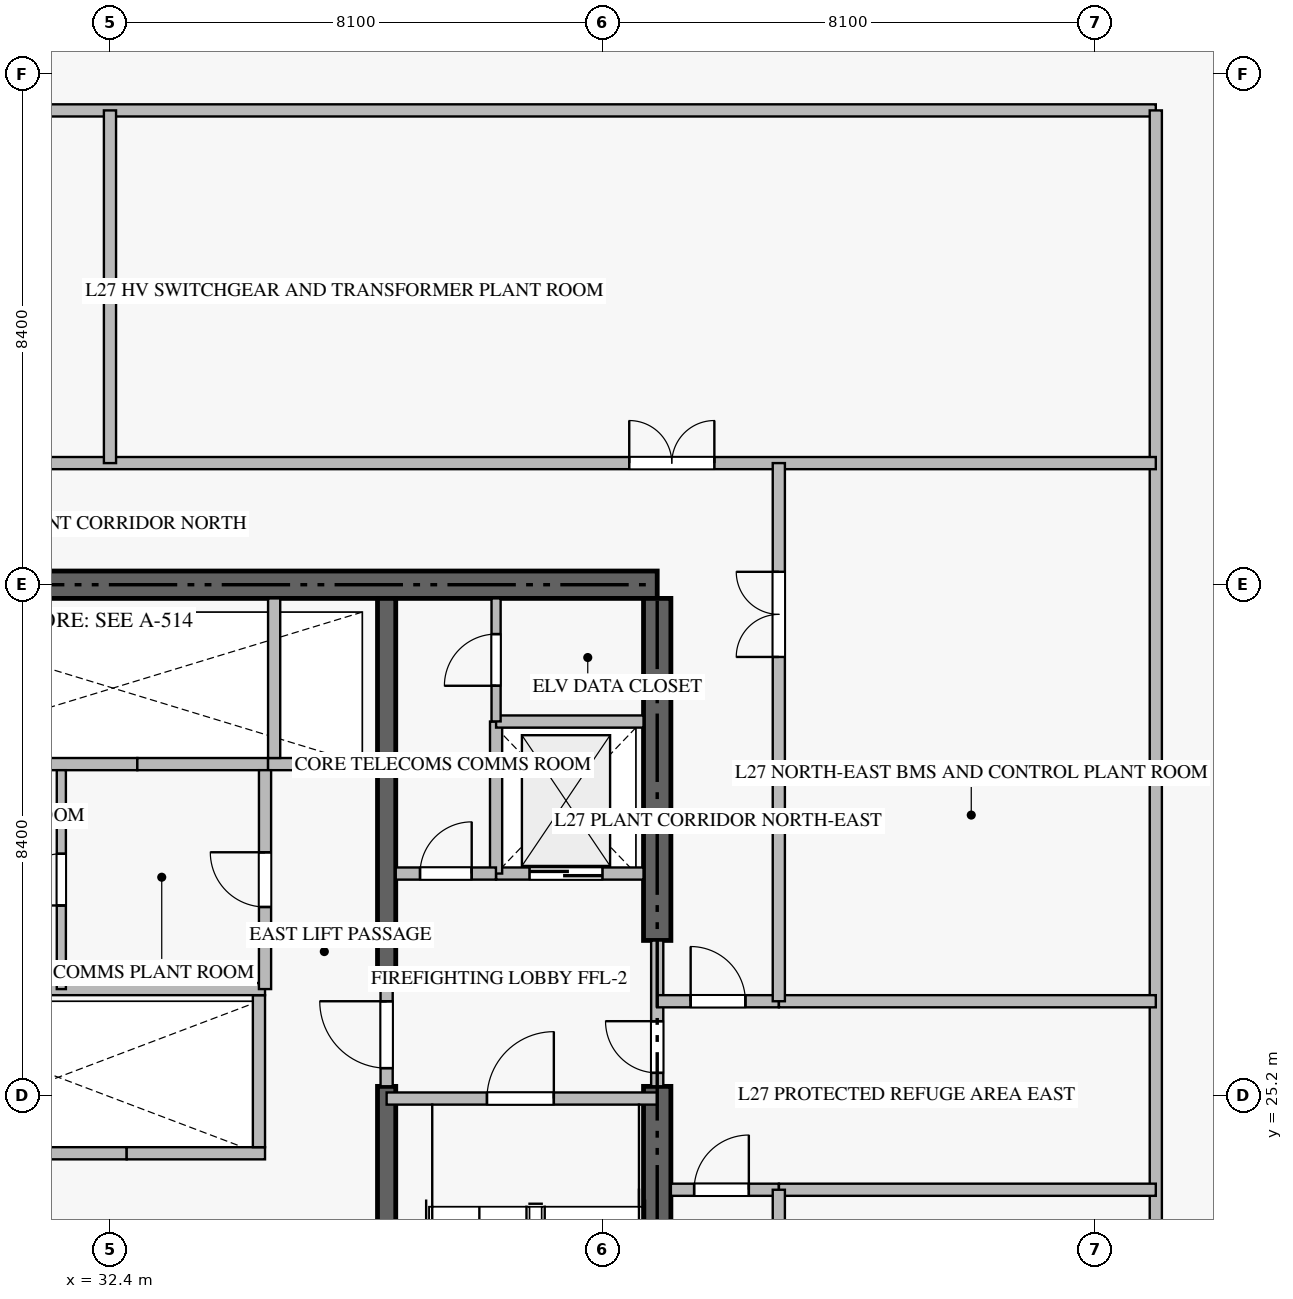
"""IFC4 building model, lengths in metres.
Left out: names, types, materials, properties, quantities, classifications, styles, units other than length and angle.
Written with IfcOpenShell. Run it as: python <this file> out.ifc"""

import sys

from ifc_helpers import new_model, si_unit, direction, frame, frame_2d, origin, place, context, subcontext, project, spatial, rectangle, extrude, source, transform, mapped, element, fill, save


model = new_model("IFC4")
c1 = context("Model", 3, precision=1e-05, world=origin(), true_north=direction((0.0, 1.0)))
c2 = subcontext(c1, "Body", "Model", "MODEL_VIEW")
j1 = project(units=[si_unit("LENGTHUNIT", "METRE"), si_unit("PLANEANGLEUNIT", "RADIAN")], contexts=[c1])
p1 = place(None, origin())
s1 = spatial("IfcSite", under=j1, at=p1, CompositionType="ELEMENT")
p2 = place(p1, origin())
s2 = spatial("IfcBuilding", under=s1, at=p2, CompositionType="ELEMENT")
p3 = place(p2, frame((0.0, 0.0, 109.2)))
s3 = spatial("IfcBuildingStorey", under=s2, at=p3, CompositionType="ELEMENT", Elevation=109.2)
p4 = place(p3, frame((41.4, 33.6, -0.36), z_axis=(0.0, 0.0, 1.0), x_axis=(-1.0, 0.0, 0.0)))
e1 = element("IfcWall", 1, at=p4, inside=s3, PredefinedType="SHEAR", context=c2, shape_type="SweptSolid", body=[
    extrude(rectangle(XDim=18.0, YDim=0.45, at=frame_2d((9.0, 0.0))), origin(), (0.0, 0.0, 1.0), 5.998),
])
p5 = place(p3, frame((41.4, 17.025, -0.36), z_axis=(0.0, 0.0, 1.0), x_axis=(0.0, 1.0, 0.0)))
e2 = element("IfcWall", 2, at=p5, inside=s3, PredefinedType="SHEAR", context=c2, shape_type="SweptSolid", body=[
    extrude(rectangle(XDim=8.325, YDim=0.45, at=frame_2d((4.163, 0.0))), origin(), (0.0, 0.0, 1.0), 5.998),
])
p6 = place(p3, frame((41.4, 27.75, -0.36), z_axis=(0.0, 0.0, 1.0), x_axis=(0.0, 1.0, 0.0)))
e3 = element("IfcWall", 3, at=p6, inside=s3, PredefinedType="SHEAR", context=c2, shape_type="SweptSolid", body=[
    extrude(rectangle(XDim=5.625, YDim=0.45, at=frame_2d((2.812, 0.0))), origin(), (0.0, 0.0, 1.0), 5.998),
])
p7 = place(p3, frame((36.95, 17.025, -0.36), z_axis=(0.0, 0.0, 1.0), x_axis=(0.0, 1.0, 0.0)))
e4 = element("IfcWall", 4, at=p7, inside=s3, PredefinedType="SHEAR", context=c2, shape_type="SweptSolid", body=[
    extrude(rectangle(XDim=8.325, YDim=0.3, at=frame_2d((4.163, 0.0))), origin(), (0.0, 0.0, 1.0), 5.998),
])
p8 = place(p3, frame((36.95, 27.05, -0.36), z_axis=(0.0, 0.0, 1.0), x_axis=(0.0, 1.0, 0.0)))
e5 = element("IfcWall", 5, at=p8, inside=s3, PredefinedType="SHEAR", context=c2, shape_type="SweptSolid", body=[
    extrude(rectangle(XDim=6.325, YDim=0.3, at=frame_2d((3.163, 0.0))), origin(), (0.0, 0.0, 1.0), 5.998),
])
p9 = place(p3, frame((36.95, 25.15, 0.0), z_axis=(0.0, 0.0, 1.0), x_axis=(1.0, 0.0, 0.0)))
e6 = element("IfcWall", 6, at=p9, inside=s3, PredefinedType="STANDARD", context=c2, shape_type="SweptSolid", body=[
    extrude(rectangle(XDim=4.45, YDim=0.2, at=frame_2d((2.225, 0.0))), origin(), (0.0, 0.0, 1.0), 5.64),
])
p10 = place(p9, frame((1.65, 0.0, 0.0)))
e7 = element("IfcOpeningElement", 7, at=p10, cuts=e6, PredefinedType="OPENING", context=c2, shape_type="SweptSolid", body=[
    extrude(rectangle(XDim=1.1, YDim=2.15, at=frame_2d((0.55, 1.075))), frame((0.0, 0.11, 0.0), z_axis=(0.0, -1.0, 0.0), x_axis=(1.0, 0.0, 0.0)), (0.0, 0.0, 1.0), 0.22),
])
p11 = place(p3, frame((38.75, 28.85, 0.0), z_axis=(0.0, 0.0, 1.0), x_axis=(1.0, 0.0, 0.0)))
e8 = element("IfcWall", 8, at=p11, inside=s3, PredefinedType="STANDARD", context=c2, shape_type="SweptSolid", body=[
    extrude(rectangle(XDim=2.425, YDim=0.2, at=frame_2d((1.212, 0.0))), origin(), (0.0, 0.0, 1.0), 5.64),
])
p12 = place(p11, frame((0.55, 0.0, 0.0)))
e9 = element("IfcOpeningElement", 9, at=p12, cuts=e8, PredefinedType="OPENING", context=c2, shape_type="SweptSolid", body=[
    extrude(rectangle(XDim=1.2, YDim=2.2, at=frame_2d((0.6, 1.1))), frame((0.0, 0.11, 0.0), z_axis=(0.0, -1.0, 0.0), x_axis=(1.0, 0.0, 0.0)), (0.0, 0.0, 1.0), 0.22),
])
p13 = place(p3, frame((30.425, 24.25, 0.0), z_axis=(0.0, 0.0, 1.0), x_axis=(1.0, 0.0, 0.0)))
e10 = element("IfcWall", 10, at=p13, inside=s3, PredefinedType="STANDARD", context=c2, shape_type="SweptSolid", body=[
    extrude(rectangle(XDim=2.25, YDim=0.2, at=frame_2d((1.125, 0.0))), origin(), (0.0, 0.0, 1.0), 5.64),
])
p14 = place(p3, frame((32.675, 24.25, 0.0), z_axis=(0.0, 0.0, 1.0), x_axis=(1.0, 0.0, 0.0)))
e11 = element("IfcWall", 11, at=p14, inside=s3, PredefinedType="STANDARD", context=c2, shape_type="SweptSolid", body=[
    extrude(rectangle(XDim=2.275, YDim=0.2, at=frame_2d((1.137, 0.0))), origin(), (0.0, 0.0, 1.0), 5.64),
])
p15 = place(p3, frame((34.85, 24.35, 0.0), z_axis=(0.0, 0.0, 1.0), x_axis=(0.0, 1.0, 0.0)))
e12 = element("IfcWall", 12, at=p15, inside=s3, PredefinedType="STANDARD", context=c2, shape_type="SweptSolid", body=[
    extrude(rectangle(XDim=2.5, YDim=0.2, at=frame_2d((1.25, 0.0))), origin(), (0.0, 0.0, 1.0), 5.64),
])
p16 = place(p3, frame((30.55, 30.65, 0.0), z_axis=(0.0, 0.0, 1.0), x_axis=(1.0, 0.0, 0.0)))
e13 = element("IfcWall", 13, at=p16, inside=s3, PredefinedType="STANDARD", context=c2, shape_type="SweptSolid", body=[
    extrude(rectangle(XDim=2.3, YDim=0.2, at=frame_2d((1.15, 0.0))), origin(), (0.0, 0.0, 1.0), 5.64),
])
p17 = place(p3, frame((32.85, 30.65, 0.0), z_axis=(0.0, 0.0, 1.0), x_axis=(1.0, 0.0, 0.0)))
e14 = element("IfcWall", 14, at=p17, inside=s3, PredefinedType="STANDARD", context=c2, shape_type="SweptSolid", body=[
    extrude(rectangle(XDim=2.15, YDim=0.2, at=frame_2d((1.075, 0.0))), origin(), (0.0, 0.0, 1.0), 5.64),
])
p18 = place(p3, frame((35.0, 30.65, 0.0), z_axis=(0.0, 0.0, 1.0), x_axis=(1.0, 0.0, 0.0)))
e15 = element("IfcWall", 15, at=p18, inside=s3, PredefinedType="STANDARD", context=c2, shape_type="SweptSolid", body=[
    extrude(rectangle(XDim=1.8, YDim=0.2, at=frame_2d((0.9, 0.0))), origin(), (0.0, 0.0, 1.0), 5.64),
])
p19 = place(p3, frame((35.1, 30.75, 0.0), z_axis=(0.0, 0.0, 1.0), x_axis=(0.0, 1.0, 0.0)))
e16 = element("IfcWall", 16, at=p19, inside=s3, PredefinedType="STANDARD", context=c2, shape_type="SweptSolid", body=[
    extrude(rectangle(XDim=2.625, YDim=0.2, at=frame_2d((1.312, 0.0))), origin(), (0.0, 0.0, 1.0), 5.64),
])
p20 = place(p3, frame((38.75, 28.85, 0.0), z_axis=(0.0, 0.0, 1.0), x_axis=(0.0, 1.0, 0.0)))
e17 = element("IfcWall", 17, at=p20, inside=s3, PredefinedType="STANDARD", context=c2, shape_type="SweptSolid", body=[
    extrude(rectangle(XDim=2.5, YDim=0.2, at=frame_2d((1.25, 0.0))), origin(), (0.0, 0.0, 1.0), 5.64),
])
p21 = place(p3, frame((38.75, 31.35, 0.0), z_axis=(0.0, 0.0, 1.0), x_axis=(1.0, 0.0, 0.0)))
e18 = element("IfcWall", 18, at=p21, inside=s3, PredefinedType="STANDARD", context=c2, shape_type="SweptSolid", body=[
    extrude(rectangle(XDim=2.425, YDim=0.2, at=frame_2d((1.212, 0.0))), origin(), (0.0, 0.0, 1.0), 5.64),
])
p22 = place(p3, frame((37.1, 28.85, 0.0), z_axis=(0.0, 0.0, 1.0), x_axis=(1.0, 0.0, 0.0)))
e19 = element("IfcWall", 19, at=p22, inside=s3, PredefinedType="STANDARD", context=c2, shape_type="SweptSolid", body=[
    extrude(rectangle(XDim=1.648, YDim=0.2, at=frame_2d((0.824, 0.0))), origin(), (0.0, 0.0, 1.0), 5.64),
])
p23 = place(p22, frame((0.399, 0.0, 0.0)))
e20 = element("IfcOpeningElement", 20, at=p23, cuts=e19, PredefinedType="OPENING", context=c2, shape_type="SweptSolid", body=[
    extrude(rectangle(XDim=0.85, YDim=2.1, at=frame_2d((0.425, 1.05))), frame((0.0, 0.11, 0.0), z_axis=(0.0, -1.0, 0.0), x_axis=(1.0, 0.0, 0.0)), (0.0, 0.0, 1.0), 0.22),
])
p24 = place(p3, frame((41.4, 25.352, 0.0), z_axis=(0.0, 0.0, 1.0), x_axis=(0.0, 1.0, 0.0)))
e21 = element("IfcWall", 21, at=p24, inside=s3, PredefinedType="STANDARD", context=c2, shape_type="SweptSolid", body=[
    extrude(rectangle(XDim=2.396, YDim=0.2, at=frame_2d((1.198, 0.0))), origin(), (0.0, 0.0, 1.0), 5.64),
])
p25 = place(p24, frame((0.22, 0.0, 0.0)))
e22 = element("IfcOpeningElement", 22, at=p25, cuts=e21, PredefinedType="OPENING", context=c2, shape_type="SweptSolid", body=[
    extrude(rectangle(XDim=0.85, YDim=2.1, at=frame_2d((0.425, 1.05))), frame((0.0, 0.11, 0.0), z_axis=(0.0, -1.0, 0.0), x_axis=(1.0, 0.0, 0.0)), (0.0, 0.0, 1.0), 0.22),
])
p26 = place(p3, frame((36.95, 25.352, 0.0), z_axis=(0.0, 0.0, 1.0), x_axis=(0.0, 1.0, 0.0)))
e23 = element("IfcWall", 23, at=p26, inside=s3, PredefinedType="STANDARD", context=c2, shape_type="SweptSolid", body=[
    extrude(rectangle(XDim=1.696, YDim=0.2, at=frame_2d((0.848, 0.0))), origin(), (0.0, 0.0, 1.0), 5.64),
])
p27 = place(p26, frame((0.298, 0.0, 0.0)))
e24 = element("IfcOpeningElement", 24, at=p27, cuts=e23, PredefinedType="OPENING", context=c2, shape_type="SweptSolid", body=[
    extrude(rectangle(XDim=1.1, YDim=2.15, at=frame_2d((0.55, 1.075))), frame((0.0, 0.11, 0.0), z_axis=(0.0, -1.0, 0.0), x_axis=(1.0, 0.0, 0.0)), (0.0, 0.0, 1.0), 0.22),
])
p28 = place(p3, frame((28.0, 26.95, 0.0), z_axis=(0.0, 0.0, 1.0), x_axis=(1.0, 0.0, 0.0)))
e25 = element("IfcWall", 25, at=p28, inside=s3, PredefinedType="STANDARD", context=c2, shape_type="SweptSolid", body=[
    extrude(rectangle(XDim=6.95, YDim=0.2, at=frame_2d((3.475, 0.0))), origin(), (0.0, 0.0, 1.0), 5.64),
])
p29 = place(p3, frame((38.75, 31.352, 0.0), z_axis=(0.0, 0.0, 1.0), x_axis=(0.0, 1.0, 0.0)))
e26 = element("IfcWall", 26, at=p29, inside=s3, PredefinedType="PARTITIONING", context=c2, shape_type="SweptSolid", body=[
    extrude(rectangle(XDim=2.023, YDim=0.15, at=frame_2d((1.011, 0.0))), origin(), (0.0, 0.0, 1.0), 5.64),
])
p30 = place(p29, frame((0.586, 0.0, 0.0)))
e27 = element("IfcOpeningElement", 27, at=p30, cuts=e26, PredefinedType="OPENING", context=c2, shape_type="SweptSolid", body=[
    extrude(rectangle(XDim=0.85, YDim=2.1, at=frame_2d((0.425, 1.05))), frame((0.0, 0.085, 0.0), z_axis=(0.0, -1.0, 0.0), x_axis=(1.0, 0.0, 0.0)), (0.0, 0.0, 1.0), 0.17),
])
p31 = place(p3, frame((34.95, 26.95, 0.0), z_axis=(0.0, 0.0, 1.0), x_axis=(0.0, 1.0, 0.0)))
e28 = element("IfcWall", 28, at=p31, inside=s3, PredefinedType="STANDARD", context=c2, shape_type="SweptSolid", body=[
    extrude(rectangle(XDim=3.6, YDim=0.2, at=frame_2d((1.8, 0.0))), origin(), (0.0, 0.0, 1.0), 5.64),
])
p32 = place(p31, frame((1.35, 0.0, 0.0)))
e29 = element("IfcOpeningElement", 29, at=p32, cuts=e28, PredefinedType="OPENING", context=c2, shape_type="SweptSolid", body=[
    extrude(rectangle(XDim=0.9, YDim=2.1, at=frame_2d((0.45, 1.05))), frame((0.0, 0.11, 0.0), z_axis=(0.0, -1.0, 0.0), x_axis=(1.0, 0.0, 0.0)), (0.0, 0.0, 1.0), 0.22),
])
p33 = place(p3, frame((31.6, 26.95, 0.0), z_axis=(0.0, 0.0, 1.0), x_axis=(0.0, 1.0, 0.0)))
e30 = element("IfcWall", 30, at=p33, inside=s3, PredefinedType="PARTITIONING", context=c2, shape_type="SweptSolid", body=[
    extrude(rectangle(XDim=3.6, YDim=0.15, at=frame_2d((1.8, 0.0))), origin(), (0.0, 0.0, 1.0), 5.64),
])
p34 = place(p33, frame((1.375, 0.0, 0.0)))
e31 = element("IfcOpeningElement", 31, at=p34, cuts=e30, PredefinedType="OPENING", context=c2, shape_type="SweptSolid", body=[
    extrude(rectangle(XDim=0.85, YDim=2.1, at=frame_2d((0.425, 1.05))), frame((0.0, 0.085, 0.0), z_axis=(0.0, -1.0, 0.0), x_axis=(1.0, 0.0, 0.0)), (0.0, 0.0, 1.0), 0.17),
])
p35 = place(p3, frame((15.2, 41.4, 0.0), z_axis=(0.0, 0.0, 1.0), x_axis=(1.0, 0.0, 0.0)))
e32 = element("IfcWall", 32, at=p35, inside=s3, PredefinedType="STANDARD", context=c2, shape_type="SweptSolid", body=[
    extrude(rectangle(XDim=34.4, YDim=0.2, at=frame_2d((17.2, 0.0))), origin(), (0.0, 0.0, 1.0), 5.64),
])
p36 = place(p3, frame((49.6, 9.0, 0.0), z_axis=(0.0, 0.0, 1.0), x_axis=(0.0, 1.0, 0.0)))
e33 = element("IfcWall", 33, at=p36, inside=s3, PredefinedType="STANDARD", context=c2, shape_type="SweptSolid", body=[
    extrude(rectangle(XDim=32.4, YDim=0.2, at=frame_2d((16.2, 0.0))), origin(), (0.0, 0.0, 1.0), 5.072),
])
p37 = place(p3, frame((41.625, 23.65, 0.0), z_axis=(0.0, 0.0, 1.0), x_axis=(1.0, 0.0, 0.0)))
e34 = element("IfcWall", 34, at=p37, inside=s3, PredefinedType="STANDARD", context=c2, shape_type="SweptSolid", body=[
    extrude(rectangle(XDim=1.775, YDim=0.2, at=frame_2d((0.887, 0.0))), origin(), (0.0, 0.0, 1.0), 5.64),
])
p38 = place(p37, frame((0.382, 0.0, 0.0)))
e35 = element("IfcOpeningElement", 35, at=p38, cuts=e34, PredefinedType="OPENING", context=c2, shape_type="SweptSolid", body=[
    extrude(rectangle(XDim=0.9, YDim=2.1, at=frame_2d((0.45, 1.05))), frame((0.0, 0.11, 0.0), z_axis=(0.0, -1.0, 0.0), x_axis=(1.0, 0.0, 0.0)), (0.0, 0.0, 1.0), 0.22),
])
p39 = place(p3, frame((43.402, 23.65, 0.0), z_axis=(0.0, 0.0, 1.0), x_axis=(1.0, 0.0, 0.0)))
e36 = element("IfcWall", 36, at=p39, inside=s3, PredefinedType="STANDARD", context=c2, shape_type="SweptSolid", body=[
    extrude(rectangle(XDim=6.198, YDim=0.2, at=frame_2d((3.099, 0.0))), origin(), (0.0, 0.0, 1.0), 5.64),
])
p40 = place(p3, frame((41.4, 26.75, 0.0), z_axis=(0.0, 0.0, 1.0), x_axis=(1.0, 0.0, 0.0)))
e37 = element("IfcWall", 37, at=p40, inside=s3, PredefinedType="STANDARD", context=c2, shape_type="SweptSolid", body=[
    extrude(rectangle(XDim=2.0, YDim=0.2, at=frame_2d((1.0, 0.0))), origin(), (0.0, 0.0, 1.0), 5.64),
])
p41 = place(p40, frame((0.55, 0.0, 0.0)))
e38 = element("IfcOpeningElement", 38, at=p41, cuts=e37, PredefinedType="OPENING", context=c2, shape_type="SweptSolid", body=[
    extrude(rectangle(XDim=0.9, YDim=2.1, at=frame_2d((0.45, 1.05))), frame((0.0, 0.11, 0.0), z_axis=(0.0, -1.0, 0.0), x_axis=(1.0, 0.0, 0.0)), (0.0, 0.0, 1.0), 0.22),
])
p42 = place(p3, frame((43.402, 26.75, 0.0), z_axis=(0.0, 0.0, 1.0), x_axis=(1.0, 0.0, 0.0)))
e39 = element("IfcWall", 39, at=p42, inside=s3, PredefinedType="STANDARD", context=c2, shape_type="SweptSolid", body=[
    extrude(rectangle(XDim=6.198, YDim=0.2, at=frame_2d((3.099, 0.0))), origin(), (0.0, 0.0, 1.0), 5.64),
])
p43 = place(p3, frame((15.2, 35.6, 0.0), z_axis=(0.0, 0.0, 1.0), x_axis=(1.0, 0.0, 0.0)))
e40 = element("IfcWall", 40, at=p43, inside=s3, PredefinedType="STANDARD", context=c2, shape_type="SweptSolid", body=[
    extrude(rectangle(XDim=34.4, YDim=0.2, at=frame_2d((17.2, 0.0))), origin(), (0.0, 0.0, 1.0), 5.64),
])
p44 = place(p43, frame((7.26, 0.0, 0.0)))
e41 = element("IfcOpeningElement", 41, at=p44, cuts=e40, PredefinedType="OPENING", context=c2, shape_type="SweptSolid", body=[
    extrude(rectangle(XDim=1.4, YDim=2.2, at=frame_2d((0.7, 1.1))), frame((0.0, 0.11, 0.0), z_axis=(0.0, -1.0, 0.0), x_axis=(1.0, 0.0, 0.0)), (0.0, 0.0, 1.0), 0.22),
])
p45 = place(p43, frame((25.74, 0.0, 0.0)))
e42 = element("IfcOpeningElement", 42, at=p45, cuts=e40, PredefinedType="OPENING", context=c2, shape_type="SweptSolid", body=[
    extrude(rectangle(XDim=1.4, YDim=2.2, at=frame_2d((0.7, 1.1))), frame((0.0, 0.11, 0.0), z_axis=(0.0, -1.0, 0.0), x_axis=(1.0, 0.0, 0.0)), (0.0, 0.0, 1.0), 0.22),
])
p46 = place(p3, frame((32.4, 35.6, 0.0), z_axis=(0.0, 0.0, 1.0), x_axis=(0.0, 1.0, 0.0)))
e43 = element("IfcWall", 43, at=p46, inside=s3, PredefinedType="STANDARD", context=c2, shape_type="SweptSolid", body=[
    extrude(rectangle(XDim=5.8, YDim=0.2, at=frame_2d((2.9, 0.0))), origin(), (0.0, 0.0, 1.0), 5.64),
])
p47 = place(p3, frame((43.4, 14.8, 0.0), z_axis=(0.0, 0.0, 1.0), x_axis=(0.0, 1.0, 0.0)))
e44 = element("IfcWall", 44, at=p47, inside=s3, PredefinedType="STANDARD", context=c2, shape_type="SweptSolid", body=[
    extrude(rectangle(XDim=8.85, YDim=0.2, at=frame_2d((4.425, 0.0))), origin(), (0.0, 0.0, 1.0), 5.64),
])
p48 = place(p47, frame((1.788, 0.0, 0.0)))
e45 = element("IfcOpeningElement", 45, at=p48, cuts=e44, PredefinedType="OPENING", context=c2, shape_type="SweptSolid", body=[
    extrude(rectangle(XDim=1.4, YDim=2.2, at=frame_2d((0.7, 1.1))), frame((0.0, 0.11, 0.0), z_axis=(0.0, -1.0, 0.0), x_axis=(1.0, 0.0, 0.0)), (0.0, 0.0, 1.0), 0.22),
])
p49 = place(p3, frame((43.4, 26.75, 0.0), z_axis=(0.0, 0.0, 1.0), x_axis=(0.0, 1.0, 0.0)))
e46 = element("IfcWall", 46, at=p49, inside=s3, PredefinedType="STANDARD", context=c2, shape_type="SweptSolid", body=[
    extrude(rectangle(XDim=8.85, YDim=0.2, at=frame_2d((4.425, 0.0))), origin(), (0.0, 0.0, 1.0), 5.64),
])
p50 = place(p49, frame((5.662, 0.0, 0.0)))
e47 = element("IfcOpeningElement", 47, at=p50, cuts=e46, PredefinedType="OPENING", context=c2, shape_type="SweptSolid", body=[
    extrude(rectangle(XDim=1.4, YDim=2.2, at=frame_2d((0.7, 1.1))), frame((0.0, 0.11, 0.0), z_axis=(0.0, -1.0, 0.0), x_axis=(1.0, 0.0, 0.0)), (0.0, 0.0, 1.0), 0.22),
])
m1 = source(origin(), c2, "Body", "SweptSolid", [
    extrude(rectangle(XDim=1.1, YDim=2.15, at=frame_2d((0.55, 1.075))), frame((0.0, 0.025, 0.0), z_axis=(0.0, -1.0, 0.0), x_axis=(1.0, 0.0, 0.0)), (0.0, 0.0, 1.0), 0.05),
])
p51 = place(p10, origin())
e48 = element("IfcDoor", 48, at=p51, inside=s3, OperationType="SINGLE_SWING_RIGHT", PredefinedType="DOOR", context=c2, shape_type="MappedRepresentation", body=[
    mapped(m1, transform((0.0, 0.0, 0.0), scale=1.0)),
])
fill(e7, e48)
m2 = source(origin(), c2, "Body", "SweptSolid", [
    extrude(rectangle(XDim=1.2, YDim=2.2, at=frame_2d((0.6, 1.1))), frame((0.0, 0.025, 0.0), z_axis=(0.0, -1.0, 0.0), x_axis=(1.0, 0.0, 0.0)), (0.0, 0.0, 1.0), 0.05),
])
p52 = place(p12, origin())
e49 = element("IfcDoor", 49, at=p52, inside=s3, OperationType="DOUBLE_DOOR_SLIDING", PredefinedType="DOOR", context=c2, shape_type="MappedRepresentation", body=[
    mapped(m2, transform((0.0, 0.0, 0.0), scale=1.0)),
])
fill(e9, e49)
m3 = source(origin(), c2, "Body", "SweptSolid", [
    extrude(rectangle(XDim=0.85, YDim=2.1, at=frame_2d((0.425, 1.05))), frame((0.0, 0.025, 0.0), z_axis=(0.0, -1.0, 0.0), x_axis=(1.0, 0.0, 0.0)), (0.0, 0.0, 1.0), 0.05),
])
p53 = place(p23, origin())
e50 = element("IfcDoor", 50, at=p53, inside=s3, OperationType="SINGLE_SWING_RIGHT", PredefinedType="DOOR", context=c2, shape_type="MappedRepresentation", body=[
    mapped(m3, transform((0.0, 0.0, 0.0), scale=1.0)),
])
fill(e20, e50)
p54 = place(p25, origin())
e51 = element("IfcDoor", 51, at=p54, inside=s3, OperationType="SINGLE_SWING_RIGHT", PredefinedType="DOOR", context=c2, shape_type="MappedRepresentation", body=[
    mapped(m3, transform((0.0, 0.0, 0.0), scale=1.0)),
])
fill(e22, e51)
p55 = place(p27, origin())
e52 = element("IfcDoor", 52, at=p55, inside=s3, OperationType="SINGLE_SWING_RIGHT", PredefinedType="DOOR", context=c2, shape_type="MappedRepresentation", body=[
    mapped(m1, transform((0.0, 0.0, 0.0), scale=1.0)),
])
fill(e24, e52)
p56 = place(p30, origin())
e53 = element("IfcDoor", 53, at=p56, inside=s3, OperationType="SINGLE_SWING_LEFT", PredefinedType="DOOR", context=c2, shape_type="MappedRepresentation", body=[
    mapped(m3, transform((0.0, 0.0, 0.0), scale=1.0)),
])
fill(e27, e53)
m4 = source(origin(), c2, "Body", "SweptSolid", [
    extrude(rectangle(XDim=0.9, YDim=2.1, at=frame_2d((0.45, 1.05))), frame((0.0, 0.025, 0.0), z_axis=(0.0, -1.0, 0.0), x_axis=(1.0, 0.0, 0.0)), (0.0, 0.0, 1.0), 0.05),
])
p57 = place(p32, origin())
e54 = element("IfcDoor", 54, at=p57, inside=s3, OperationType="SINGLE_SWING_RIGHT", PredefinedType="DOOR", context=c2, shape_type="MappedRepresentation", body=[
    mapped(m4, transform((0.0, 0.0, 0.0), scale=1.0)),
])
fill(e29, e54)
p58 = place(p34, origin())
e55 = element("IfcDoor", 55, at=p58, inside=s3, OperationType="SINGLE_SWING_LEFT", PredefinedType="DOOR", context=c2, shape_type="MappedRepresentation", body=[
    mapped(m3, transform((0.0, 0.0, 0.0), scale=1.0)),
])
fill(e31, e55)
p59 = place(p38, origin())
e56 = element("IfcDoor", 56, at=p59, inside=s3, OperationType="SINGLE_SWING_RIGHT", PredefinedType="DOOR", context=c2, shape_type="MappedRepresentation", body=[
    mapped(m4, transform((0.0, 0.0, 0.0), scale=1.0)),
])
fill(e35, e56)
p60 = place(p41, origin())
e57 = element("IfcDoor", 57, at=p60, inside=s3, OperationType="SINGLE_SWING_LEFT", PredefinedType="DOOR", context=c2, shape_type="MappedRepresentation", body=[
    mapped(m4, transform((0.0, 0.0, 0.0), scale=1.0)),
])
fill(e38, e57)
m5 = source(origin(), c2, "Body", "SweptSolid", [
    extrude(rectangle(XDim=1.4, YDim=2.2, at=frame_2d((0.7, 1.1))), frame((0.0, 0.025, 0.0), z_axis=(0.0, -1.0, 0.0), x_axis=(1.0, 0.0, 0.0)), (0.0, 0.0, 1.0), 0.05),
])
p61 = place(p45, origin())
e58 = element("IfcDoor", 58, at=p61, inside=s3, OperationType="DOUBLE_DOOR_SINGLE_SWING", PredefinedType="DOOR", context=c2, shape_type="MappedRepresentation", body=[
    mapped(m5, transform((0.0, 0.0, 0.0), scale=1.0)),
])
fill(e42, e58)
p62 = place(p50, origin())
e59 = element("IfcDoor", 59, at=p62, inside=s3, OperationType="DOUBLE_DOOR_SINGLE_SWING", PredefinedType="DOOR", context=c2, shape_type="MappedRepresentation", body=[
    mapped(m5, transform((0.0, 0.0, 0.0), scale=1.0)),
])
fill(e47, e59)
save(model, sys.argv[1])
